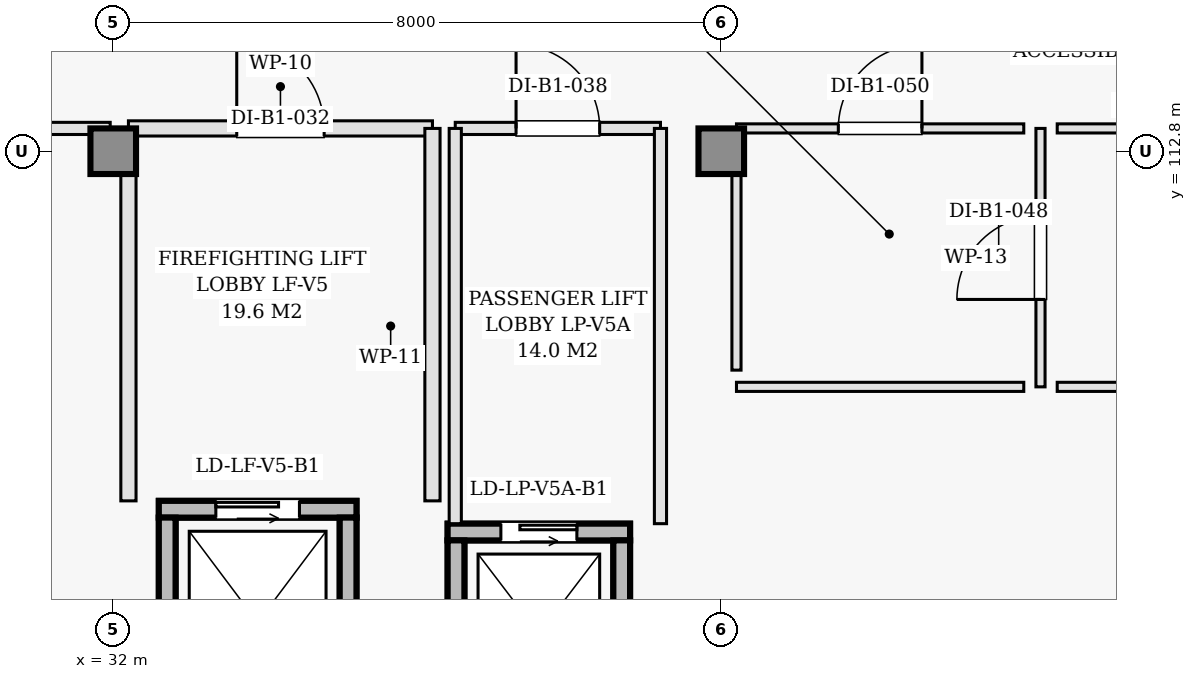
"""IFC4 building model, lengths in metres.
Left out: names, types, materials, properties, quantities, classifications, styles, units other than length and angle.
Written with IfcOpenShell. Run it as: python <this file> out.ifc"""

import sys

from ifc_helpers import new_model, si_unit, direction, frame, frame_2d, origin, origin_2d, place, context, subcontext, project, spatial, rectangle, extrude, element, fill, save


model = new_model("IFC4")
c1 = context("Model", 3, precision=1e-05, world=origin(), true_north=direction((0.0, 1.0)))
c2 = subcontext(c1, "Body", "Model", "MODEL_VIEW")
j1 = project(units=[si_unit("LENGTHUNIT", "METRE"), si_unit("PLANEANGLEUNIT", "RADIAN")], contexts=[c1])
p1 = place(None, origin())
s1 = spatial("IfcSite", under=j1, at=p1, CompositionType="ELEMENT")
p2 = place(p1, origin())
s2 = spatial("IfcBuilding", under=s1, at=p2, CompositionType="ELEMENT")
p3 = place(p2, frame((0.0, 0.0, -4.5)))
s3 = spatial("IfcBuildingStorey", under=s2, at=p3, CompositionType="ELEMENT", Elevation=-4.5)
for number, where, z_axis, x_axis in (
    (1, (32.0, 112.8, 0.0), (0.0, 0.0, 1.0), (1.0, 0.0, 0.0)),
    (2, (40.0, 112.8, 0.0), (0.0, 0.0, 1.0), (1.0, 0.0, 0.0)),
):
    element("IfcColumn", number, at=place(p3, frame(where, z_axis=z_axis, x_axis=x_axis)), inside=s3, PredefinedType="COLUMN", context=c2, shape_type="SweptSolid", body=[
        extrude(rectangle(XDim=0.6, YDim=0.6, at=origin_2d()), origin(), (0.0, 0.0, 1.0), 4.5),
    ])
p4 = place(p3, frame((32.6, 108.09, -1.4), z_axis=(0.0, 0.0, 1.0), x_axis=(1.0, 0.0, 0.0)))
e3 = element("IfcWall", 3, at=p4, inside=s3, PredefinedType="SHEAR", context=c2, shape_type="SweptSolid", body=[
    extrude(rectangle(XDim=2.6, YDim=0.22, at=frame_2d((1.3, 0.0))), origin(), (0.0, 0.0, 1.0), 0.9),
])
for number, where, z_axis, x_axis in (
    (4, (32.71, 105.22, -1.4), (0.0, 0.0, 1.0), (0.0, 1.0, 0.0)),
    (5, (35.09, 105.22, -1.4), (0.0, 0.0, 1.0), (0.0, 1.0, 0.0)),
):
    element("IfcWall", number, at=place(p3, frame(where, z_axis=z_axis, x_axis=x_axis)), inside=s3, PredefinedType="SHEAR", context=c2, shape_type="SweptSolid", body=[
        extrude(rectangle(XDim=2.76, YDim=0.22, at=frame_2d((1.38, 0.0))), origin(), (0.0, 0.0, 1.0), 0.9),
    ])
p5 = place(p3, frame((32.6, 108.09, 0.0), z_axis=(0.0, 0.0, 1.0), x_axis=(1.0, 0.0, 0.0)))
e6 = element("IfcWall", 6, at=p5, inside=s3, PredefinedType="SHEAR", context=c2, shape_type="SweptSolid", body=[
    extrude(rectangle(XDim=2.6, YDim=0.22, at=frame_2d((1.3, 0.0))), origin(), (0.0, 0.0, 1.0), 4.15),
])
p6 = place(p5, frame((0.75, 0.0, 0.0)))
e7 = element("IfcOpeningElement", 7, at=p6, cuts=e6, PredefinedType="OPENING", context=c2, shape_type="SweptSolid", body=[
    extrude(rectangle(XDim=1.1, YDim=2.15, at=frame_2d((0.55, 1.075))), frame((0.0, 0.12, 0.0), z_axis=(0.0, -1.0, 0.0), x_axis=(1.0, 0.0, 0.0)), (0.0, 0.0, 1.0), 0.24),
])
for number, where, z_axis, x_axis in (
    (8, (32.71, 105.22, 0.0), (0.0, 0.0, 1.0), (0.0, 1.0, 0.0)),
    (9, (35.09, 105.22, 0.0), (0.0, 0.0, 1.0), (0.0, 1.0, 0.0)),
):
    element("IfcWall", number, at=place(p3, frame(where, z_axis=z_axis, x_axis=x_axis)), inside=s3, PredefinedType="SHEAR", context=c2, shape_type="SweptSolid", body=[
        extrude(rectangle(XDim=2.76, YDim=0.22, at=frame_2d((1.38, 0.0))), origin(), (0.0, 0.0, 1.0), 4.15),
    ])
p7 = place(p3, frame((32.2, 113.1, 0.0), z_axis=(0.0, 0.0, 1.0), x_axis=(1.0, 0.0, 0.0)))
e10 = element("IfcWall", 10, at=p7, inside=s3, PredefinedType="PARTITIONING", context=c2, shape_type="SweptSolid", body=[
    extrude(rectangle(XDim=4.0, YDim=0.2, at=frame_2d((2.0, 0.0))), origin(), (0.0, 0.0, 1.0), 3.385),
])
p8 = place(p7, frame((1.425, 0.0, 0.0)))
e11 = element("IfcOpeningElement", 11, at=p8, cuts=e10, PredefinedType="OPENING", context=c2, shape_type="SweptSolid", body=[
    extrude(rectangle(XDim=1.15, YDim=2.15, at=frame_2d((0.575, 1.075))), frame((0.0, 0.11, 0.0), z_axis=(0.0, -1.0, 0.0), x_axis=(1.0, 0.0, 0.0)), (0.0, 0.0, 1.0), 0.22),
])
for number, where, z_axis, x_axis in (
    (12, (32.2, 108.2, 0.0), (0.0, 0.0, 1.0), (0.0, 1.0, 0.0)),
    (13, (36.2, 108.2, 0.0), (0.0, 0.0, 1.0), (0.0, 1.0, 0.0)),
):
    element("IfcWall", number, at=place(p3, frame(where, z_axis=z_axis, x_axis=x_axis)), inside=s3, PredefinedType="PARTITIONING", context=c2, shape_type="SweptSolid", body=[
        extrude(rectangle(XDim=4.9, YDim=0.2, at=frame_2d((2.45, 0.0))), origin(), (0.0, 0.0, 1.0), 3.385),
    ])
p9 = place(p3, frame((36.4, 107.79, -1.4), z_axis=(0.0, 0.0, 1.0), x_axis=(1.0, 0.0, 0.0)))
e14 = element("IfcWall", 14, at=p9, inside=s3, PredefinedType="SHEAR", context=c2, shape_type="SweptSolid", body=[
    extrude(rectangle(XDim=2.4, YDim=0.22, at=frame_2d((1.2, 0.0))), origin(), (0.0, 0.0, 1.0), 0.9),
])
for number, where, z_axis, x_axis in (
    (15, (36.51, 105.22, -1.4), (0.0, 0.0, 1.0), (0.0, 1.0, 0.0)),
    (16, (38.69, 105.22, -1.4), (0.0, 0.0, 1.0), (0.0, 1.0, 0.0)),
):
    element("IfcWall", number, at=place(p3, frame(where, z_axis=z_axis, x_axis=x_axis)), inside=s3, PredefinedType="SHEAR", context=c2, shape_type="SweptSolid", body=[
        extrude(rectangle(XDim=2.46, YDim=0.22, at=frame_2d((1.23, 0.0))), origin(), (0.0, 0.0, 1.0), 0.9),
    ])
p10 = place(p3, frame((36.4, 107.79, 0.0), z_axis=(0.0, 0.0, 1.0), x_axis=(1.0, 0.0, 0.0)))
e17 = element("IfcWall", 17, at=p10, inside=s3, PredefinedType="SHEAR", context=c2, shape_type="SweptSolid", body=[
    extrude(rectangle(XDim=2.4, YDim=0.22, at=frame_2d((1.2, 0.0))), origin(), (0.0, 0.0, 1.0), 4.15),
])
p11 = place(p10, frame((0.7, 0.0, 0.0)))
e18 = element("IfcOpeningElement", 18, at=p11, cuts=e17, PredefinedType="OPENING", context=c2, shape_type="SweptSolid", body=[
    extrude(rectangle(XDim=1.0, YDim=2.15, at=frame_2d((0.5, 1.075))), frame((0.0, 0.12, 0.0), z_axis=(0.0, -1.0, 0.0), x_axis=(1.0, 0.0, 0.0)), (0.0, 0.0, 1.0), 0.24),
])
for number, where, z_axis, x_axis in (
    (19, (36.51, 105.22, 0.0), (0.0, 0.0, 1.0), (0.0, 1.0, 0.0)),
    (20, (38.69, 105.22, 0.0), (0.0, 0.0, 1.0), (0.0, 1.0, 0.0)),
):
    element("IfcWall", number, at=place(p3, frame(where, z_axis=z_axis, x_axis=x_axis)), inside=s3, PredefinedType="SHEAR", context=c2, shape_type="SweptSolid", body=[
        extrude(rectangle(XDim=2.46, YDim=0.22, at=frame_2d((1.23, 0.0))), origin(), (0.0, 0.0, 1.0), 4.15),
    ])
p12 = place(p3, frame((36.5, 113.1, 0.0), z_axis=(0.0, 0.0, 1.0), x_axis=(1.0, 0.0, 0.0)))
e21 = element("IfcWall", 21, at=p12, inside=s3, PredefinedType="PARTITIONING", context=c2, shape_type="SweptSolid", body=[
    extrude(rectangle(XDim=2.7, YDim=0.16, at=frame_2d((1.35, 0.0))), origin(), (0.0, 0.0, 1.0), 3.385),
])
p13 = place(p12, frame((0.8, 0.0, 0.0)))
e22 = element("IfcOpeningElement", 22, at=p13, cuts=e21, PredefinedType="OPENING", context=c2, shape_type="SweptSolid", body=[
    extrude(rectangle(XDim=1.1, YDim=2.15, at=frame_2d((0.55, 1.075))), frame((0.0, 0.09, 0.0), z_axis=(0.0, -1.0, 0.0), x_axis=(1.0, 0.0, 0.0)), (0.0, 0.0, 1.0), 0.18),
])
for number, where, z_axis, x_axis in (
    (23, (36.5, 107.9, 0.0), (0.0, 0.0, 1.0), (0.0, 1.0, 0.0)),
    (24, (39.2, 107.9, 0.0), (0.0, 0.0, 1.0), (0.0, 1.0, 0.0)),
):
    element("IfcWall", number, at=place(p3, frame(where, z_axis=z_axis, x_axis=x_axis)), inside=s3, PredefinedType="PARTITIONING", context=c2, shape_type="SweptSolid", body=[
        extrude(rectangle(XDim=5.2, YDim=0.16, at=frame_2d((2.6, 0.0))), origin(), (0.0, 0.0, 1.0), 3.385),
    ])
p14 = place(p3, frame((44.2, 109.7, 0.0), z_axis=(0.0, 0.0, 1.0), x_axis=(0.0, 1.0, 0.0)))
e25 = element("IfcWall", 25, at=p14, inside=s3, PredefinedType="PARTITIONING", context=c2, shape_type="SweptSolid", body=[
    extrude(rectangle(XDim=3.4, YDim=0.12, at=frame_2d((1.7, 0.0))), origin(), (0.0, 0.0, 1.0), 3.385),
])
p15 = place(p14, frame((1.15, 0.0, 0.0)))
e26 = element("IfcOpeningElement", 26, at=p15, cuts=e25, PredefinedType="OPENING", context=c2, shape_type="SweptSolid", body=[
    extrude(rectangle(XDim=1.1, YDim=2.15, at=frame_2d((0.55, 1.075))), frame((0.0, 0.07, 0.0), z_axis=(0.0, -1.0, 0.0), x_axis=(1.0, 0.0, 0.0)), (0.0, 0.0, 1.0), 0.14),
])
p16 = place(p3, frame((44.42, 109.7, 0.0), z_axis=(0.0, 0.0, 1.0), x_axis=(1.0, 0.0, 0.0)))
e27 = element("IfcWall", 27, at=p16, inside=s3, PredefinedType="PARTITIONING", context=c2, shape_type="SweptSolid", body=[
    extrude(rectangle(XDim=2.78, YDim=0.12, at=frame_2d((1.39, 0.0))), origin(), (0.0, 0.0, 1.0), 3.585),
])
p17 = place(p3, frame((44.42, 113.1, 0.0), z_axis=(0.0, 0.0, 1.0), x_axis=(1.0, 0.0, 0.0)))
e28 = element("IfcWall", 28, at=p17, inside=s3, PredefinedType="PARTITIONING", context=c2, shape_type="SweptSolid", body=[
    extrude(rectangle(XDim=2.78, YDim=0.12, at=frame_2d((1.39, 0.0))), origin(), (0.0, 0.0, 1.0), 3.385),
])
p18 = place(p3, frame((40.2, 113.1, 0.0), z_axis=(0.0, 0.0, 1.0), x_axis=(1.0, 0.0, 0.0)))
e29 = element("IfcWall", 29, at=p18, inside=s3, PredefinedType="PARTITIONING", context=c2, shape_type="SweptSolid", body=[
    extrude(rectangle(XDim=3.78, YDim=0.12, at=frame_2d((1.89, 0.0))), origin(), (0.0, 0.0, 1.0), 3.385),
])
p19 = place(p18, frame((1.34, 0.0, 0.0)))
e30 = element("IfcOpeningElement", 30, at=p19, cuts=e29, PredefinedType="OPENING", context=c2, shape_type="SweptSolid", body=[
    extrude(rectangle(XDim=1.1, YDim=2.15, at=frame_2d((0.55, 1.075))), frame((0.0, 0.07, 0.0), z_axis=(0.0, -1.0, 0.0), x_axis=(1.0, 0.0, 0.0)), (0.0, 0.0, 1.0), 0.14),
])
p20 = place(p3, frame((40.2, 109.7, 0.0), z_axis=(0.0, 0.0, 1.0), x_axis=(1.0, 0.0, 0.0)))
e31 = element("IfcWall", 31, at=p20, inside=s3, PredefinedType="PARTITIONING", context=c2, shape_type="SweptSolid", body=[
    extrude(rectangle(XDim=3.78, YDim=0.12, at=frame_2d((1.89, 0.0))), origin(), (0.0, 0.0, 1.0), 3.585),
])
p21 = place(p3, frame((40.2, 109.92, 0.0), z_axis=(0.0, 0.0, 1.0), x_axis=(0.0, 1.0, 0.0)))
e32 = element("IfcWall", 32, at=p21, inside=s3, PredefinedType="PARTITIONING", context=c2, shape_type="SweptSolid", body=[
    extrude(rectangle(XDim=2.96, YDim=0.12, at=frame_2d((1.48, 0.0))), origin(), (0.0, 0.0, 1.0), 3.385),
])
p22 = place(p3, frame((29.087, 113.1, 0.0), z_axis=(0.0, 0.0, 1.0), x_axis=(1.0, 0.0, 0.0)))
e33 = element("IfcWall", 33, at=p22, inside=s3, PredefinedType="PARTITIONING", context=c2, shape_type="SweptSolid", body=[
    extrude(rectangle(XDim=2.873, YDim=0.16, at=frame_2d((1.437, 0.0))), origin(), (0.0, 0.0, 1.0), 3.485),
])
p23 = place(p6, origin())
e34 = element("IfcDoor", 34, at=p23, inside=s3, OperationType="SLIDING_TO_LEFT", PredefinedType="DOOR", context=c2, shape_type="SweptSolid", body=[
    extrude(rectangle(XDim=1.1, YDim=2.15, at=frame_2d((0.55, 1.075))), frame((0.0, 0.025, 0.0), z_axis=(0.0, -1.0, 0.0), x_axis=(1.0, 0.0, 0.0)), (0.0, 0.0, 1.0), 0.05),
])
fill(e7, e34)
p24 = place(p8, origin())
e35 = element("IfcDoor", 35, at=p24, inside=s3, OperationType="SINGLE_SWING_LEFT", PredefinedType="DOOR", context=c2, shape_type="SweptSolid", body=[
    extrude(rectangle(XDim=1.15, YDim=2.15, at=frame_2d((0.575, 1.075))), frame((0.0, 0.025, 0.0), z_axis=(0.0, -1.0, 0.0), x_axis=(1.0, 0.0, 0.0)), (0.0, 0.0, 1.0), 0.05),
])
fill(e11, e35)
p25 = place(p11, origin())
e36 = element("IfcDoor", 36, at=p25, inside=s3, OperationType="SLIDING_TO_RIGHT", PredefinedType="DOOR", context=c2, shape_type="SweptSolid", body=[
    extrude(rectangle(XDim=1.0, YDim=2.15, at=frame_2d((0.5, 1.075))), frame((0.0, 0.025, 0.0), z_axis=(0.0, -1.0, 0.0), x_axis=(1.0, 0.0, 0.0)), (0.0, 0.0, 1.0), 0.05),
])
fill(e18, e36)
p26 = place(p13, origin())
e37 = element("IfcDoor", 37, at=p26, inside=s3, OperationType="SINGLE_SWING_LEFT", PredefinedType="DOOR", context=c2, shape_type="SweptSolid", body=[
    extrude(rectangle(XDim=1.1, YDim=2.15, at=frame_2d((0.55, 1.075))), frame((0.0, 0.025, 0.0), z_axis=(0.0, -1.0, 0.0), x_axis=(1.0, 0.0, 0.0)), (0.0, 0.0, 1.0), 0.05),
])
fill(e22, e37)
p27 = place(p15, origin())
e38 = element("IfcDoor", 38, at=p27, inside=s3, OperationType="SINGLE_SWING_LEFT", PredefinedType="DOOR", context=c2, shape_type="SweptSolid", body=[
    extrude(rectangle(XDim=1.1, YDim=2.15, at=frame_2d((0.55, 1.075))), frame((0.0, 0.025, 0.0), z_axis=(0.0, -1.0, 0.0), x_axis=(1.0, 0.0, 0.0)), (0.0, 0.0, 1.0), 0.05),
])
fill(e26, e38)
p28 = place(p19, origin())
e39 = element("IfcDoor", 39, at=p28, inside=s3, OperationType="SINGLE_SWING_RIGHT", PredefinedType="DOOR", context=c2, shape_type="SweptSolid", body=[
    extrude(rectangle(XDim=1.1, YDim=2.15, at=frame_2d((0.55, 1.075))), frame((0.0, 0.025, 0.0), z_axis=(0.0, -1.0, 0.0), x_axis=(1.0, 0.0, 0.0)), (0.0, 0.0, 1.0), 0.05),
])
fill(e30, e39)
save(model, sys.argv[1])
